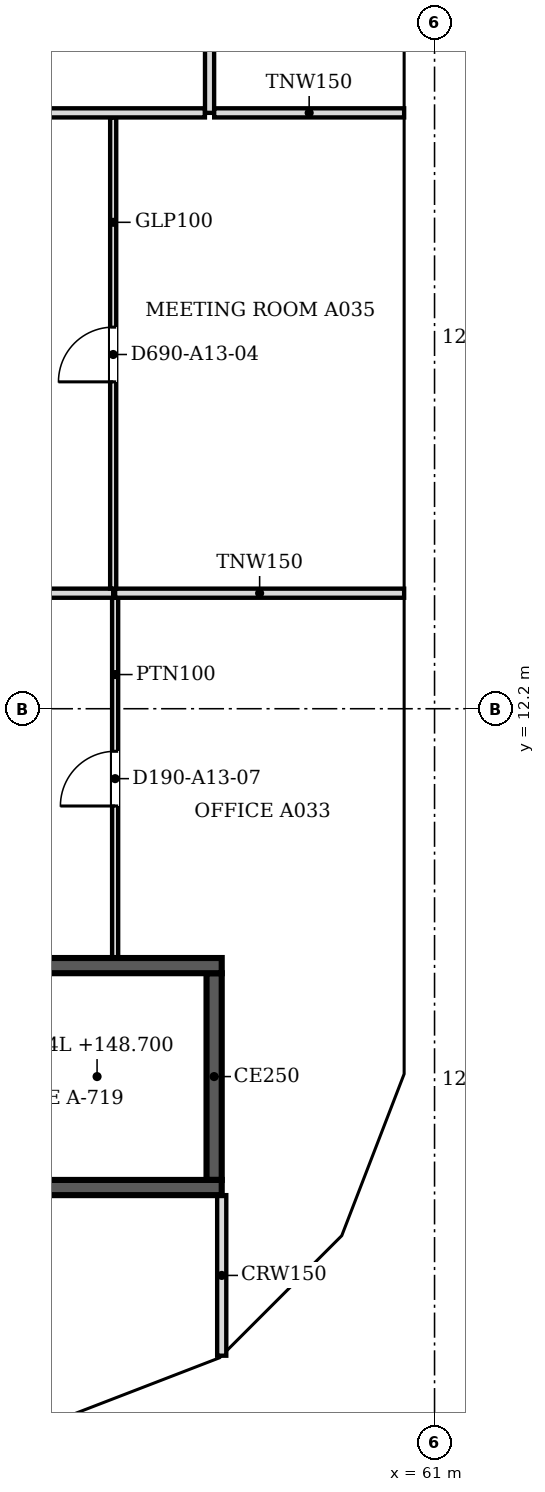
"""IFC4 building model, lengths in metres.
Left out: names, types, materials, properties, quantities, classifications, styles, units other than length and angle.
Written with IfcOpenShell. Run it as: python <this file> out.ifc"""

import sys

from ifc_helpers import new_model, si_unit, direction, frame, frame_2d, origin, place, context, subcontext, project, spatial, polyline, rectangle, outline, extrude, faceted_brep, source, transform, mapped, element, fill, save


model = new_model("IFC4")
c1 = context("Model", 3, precision=1e-05, world=origin(), true_north=direction((0.0, 1.0)))
c2 = subcontext(c1, "Body", "Model", "MODEL_VIEW")
j1 = project(units=[si_unit("LENGTHUNIT", "METRE"), si_unit("PLANEANGLEUNIT", "RADIAN")], contexts=[c1])
p1 = place(None, origin())
s1 = spatial("IfcSite", under=j1, at=p1, CompositionType="ELEMENT")
p2 = place(p1, origin())
s2 = spatial("IfcBuilding", under=s1, at=p2, CompositionType="ELEMENT")
p3 = place(p2, frame((0.0, 0.0, 146.8)))
s3 = spatial("IfcBuildingStorey", under=s2, at=p3, CompositionType="ELEMENT", Elevation=146.8)
m1 = source(origin(), c2, "Body", "Brep", [
    faceted_brep([(2.95, -0.25, 0.0), (3.003, -0.25, 0.068), (3.003, -0.25, 7.532), (2.95, -0.25, 7.6), (0.0, -0.25, 3.8), (0.047, 0.25, 3.86), (2.898, 0.25, 7.532), (2.898, 0.25, 0.068), (0.047, 0.25, 3.74), (2.95, 0.0, 0.0), (2.95, 0.0, 7.6), (0.0, 0.0, 3.8)], [[[0, 1, 2, 3, 4]], [[5, 6, 7, 8]], [[1, 0, 9]], [[10, 3, 2]], [[6, 5, 11, 4, 3, 10]], [[8, 7, 9, 0, 4, 11]], [[8, 11, 5]], [[1, 9, 7, 6, 10, 2]]]),
])
p4 = place(p3, frame((54.854, 0.25, -3.8), z_axis=(0.0, 0.0, 1.0), x_axis=(0.932970071518, 0.359953949349, 0.0)))
e1 = element("IfcWall", 1, at=p4, inside=s3, PredefinedType="SOLIDWALL", context=c2, shape_type="MappedRepresentation", body=[
    mapped(m1, transform((0.0, 0.0, 0.0), scale=1.0)),
])
m2 = source(origin(), c2, "Body", "SweptSolid", [
    extrude(outline(polyline([(2.75, 6.935), (0.316, 3.8), (2.75, 0.665), (2.75, 6.935)])), frame((0.0, 0.26, 0.0), z_axis=(0.0, -1.0, 0.0), x_axis=(1.0, 0.0, 0.0)), (0.0, 0.0, 1.0), 0.52),
])
p5 = place(p4, origin())
e2 = element("IfcOpeningElement", 2, at=p5, cuts=e1, PredefinedType="OPENING", context=c2, shape_type="MappedRepresentation", body=[
    mapped(m2, transform((0.0, 0.0, 0.0), scale=1.0)),
])
m3 = source(origin(), c2, "Body", "Brep", [
    faceted_brep([(0.053, -0.25, 0.0), (2.997, -0.25, 3.8), (0.053, -0.25, 7.6), (0.0, -0.25, 7.532), (0.0, -0.25, 0.068), (0.106, 0.25, 7.532), (2.944, 0.25, 3.868), (2.944, 0.25, 3.732), (0.106, 0.25, 0.068), (2.997, 0.0, 3.8), (0.053, 0.0, 0.0), (0.053, 0.0, 7.6)], [[[0, 1, 2, 3, 4]], [[5, 6, 7, 8]], [[8, 7, 9, 1, 0, 10]], [[6, 5, 11, 2, 1, 9]], [[3, 2, 11]], [[10, 0, 4]], [[8, 10, 4, 3, 11, 5]], [[9, 7, 6]]]),
])
p6 = place(p3, frame((57.569, 1.274, -3.8), z_axis=(0.0, 0.0, 1.0), x_axis=(0.707066050402, 0.707147509625, 0.0)))
e3 = element("IfcWall", 3, at=p6, inside=s3, PredefinedType="SOLIDWALL", context=c2, shape_type="MappedRepresentation", body=[
    mapped(m3, transform((0.0, 0.0, 0.0), scale=1.0)),
])
m4 = source(origin(), c2, "Body", "SweptSolid", [
    extrude(outline(polyline([(0.253, 0.666), (2.681, 3.8), (0.253, 6.934), (0.253, 0.666)])), frame((0.0, 0.26, 0.0), z_axis=(0.0, -1.0, 0.0), x_axis=(1.0, 0.0, 0.0)), (0.0, 0.0, 1.0), 0.52),
])
p7 = place(p6, origin())
e4 = element("IfcOpeningElement", 4, at=p7, cuts=e3, PredefinedType="OPENING", context=c2, shape_type="MappedRepresentation", body=[
    mapped(m4, transform((0.0, 0.0, 0.0), scale=1.0)),
])
m5 = source(origin(), c2, "Body", "Brep", [
    faceted_brep([(2.95, -0.25, 0.0), (2.997, -0.25, 0.059), (2.997, -0.25, 7.541), (2.95, -0.25, 7.6), (0.0, -0.25, 3.8), (0.053, 0.25, 3.868), (2.904, 0.25, 7.54), (2.904, 0.25, 0.06), (0.053, 0.25, 3.732), (2.95, 0.0, 0.0), (2.95, 0.0, 7.6), (0.0, 0.0, 3.8)], [[[0, 1, 2, 3, 4]], [[5, 6, 7, 8]], [[1, 0, 9]], [[10, 3, 2]], [[6, 5, 11, 4, 3, 10]], [[8, 7, 9, 0, 4, 11]], [[8, 11, 5]], [[1, 9, 7, 6, 10, 2]]]),
])
p8 = place(p3, frame((59.688, 3.394, -3.8), z_axis=(0.0, 0.0, 1.0), x_axis=(0.359972353723, 0.932962970624, 0.0)))
e5 = element("IfcWall", 5, at=p8, inside=s3, PredefinedType="SOLIDWALL", context=c2, shape_type="MappedRepresentation", body=[
    mapped(m5, transform((0.0, 0.0, 0.0), scale=1.0)),
])
p9 = place(p8, origin())
e6 = element("IfcOpeningElement", 6, at=p9, cuts=e5, PredefinedType="OPENING", context=c2, shape_type="MappedRepresentation", body=[
    mapped(m2, transform((0.0, 0.0, 0.0), scale=1.0)),
])
m6 = source(origin(), c2, "Body", "Brep", [
    faceted_brep([(0.047, -0.25, 0.0), (3.05, -0.25, 3.8), (0.047, -0.25, 7.6), (0.0, -0.25, 7.54), (0.0, -0.25, 0.06), (0.093, 0.25, 7.541), (3.05, 0.25, 3.8), (0.093, 0.25, 0.059), (0.047, 0.0, 0.0), (0.047, 0.0, 7.6)], [[[0, 1, 2, 3, 4]], [[5, 6, 7]], [[7, 6, 1, 0, 8]], [[6, 5, 9, 2, 1]], [[3, 2, 9]], [[8, 0, 4]], [[7, 8, 4, 3, 9, 5]]]),
])
p10 = place(p3, frame((60.75, 6.1, -3.8), z_axis=(0.0, 0.0, 1.0), x_axis=(0.0, 1.0, 0.0)))
e7 = element("IfcWall", 7, at=p10, inside=s3, PredefinedType="SOLIDWALL", context=c2, shape_type="MappedRepresentation", body=[
    mapped(m6, transform((0.0, 0.0, 0.0), scale=1.0)),
])
m7 = source(origin(), c2, "Body", "SweptSolid", [
    extrude(outline(polyline([(0.247, 0.656), (2.731, 3.8), (0.247, 6.944), (0.247, 0.656)])), frame((0.0, 0.26, 0.0), z_axis=(0.0, -1.0, 0.0), x_axis=(1.0, 0.0, 0.0)), (0.0, 0.0, 1.0), 0.52),
])
p11 = place(p10, origin())
e8 = element("IfcOpeningElement", 8, at=p11, cuts=e7, PredefinedType="OPENING", context=c2, shape_type="MappedRepresentation", body=[
    mapped(m7, transform((0.0, 0.0, 0.0), scale=1.0)),
])
m8 = source(origin(), c2, "Body", "SweptSolid", [
    extrude(outline(polyline([(3.05, 0.0), (6.1, 3.8), (3.05, 7.6), (0.0, 3.8), (3.05, 0.0)])), frame((0.0, 0.25, 0.0), z_axis=(0.0, -1.0, 0.0), x_axis=(1.0, 0.0, 0.0)), (0.0, 0.0, 1.0), 0.5),
])
p12 = place(p3, frame((60.75, 9.15, -3.8), z_axis=(0.0, 0.0, 1.0), x_axis=(0.0, 1.0, 0.0)))
e9 = element("IfcWall", 9, at=p12, inside=s3, PredefinedType="SOLIDWALL", context=c2, shape_type="MappedRepresentation", body=[
    mapped(m8, transform((0.0, 0.0, 0.0), scale=1.0)),
])
m9 = source(origin(), c2, "Body", "SweptSolid", [
    extrude(outline(polyline([(3.05, 0.399), (5.78, 3.8), (3.05, 7.201), (0.321, 3.8), (3.05, 0.399)])), frame((0.0, 0.26, 0.0), z_axis=(0.0, -1.0, 0.0), x_axis=(1.0, 0.0, 0.0)), (0.0, 0.0, 1.0), 0.52),
])
p13 = place(p12, origin())
e10 = element("IfcOpeningElement", 10, at=p13, cuts=e9, PredefinedType="OPENING", context=c2, shape_type="MappedRepresentation", body=[
    mapped(m9, transform((0.0, 0.0, 0.0), scale=1.0)),
])
p14 = place(p3, frame((60.75, 15.25, -3.8), z_axis=(0.0, 0.0, 1.0), x_axis=(0.0, 1.0, 0.0)))
e11 = element("IfcWall", 11, at=p14, inside=s3, PredefinedType="SOLIDWALL", context=c2, shape_type="MappedRepresentation", body=[
    mapped(m8, transform((0.0, 0.0, 0.0), scale=1.0)),
])
p15 = place(p14, origin())
e12 = element("IfcOpeningElement", 12, at=p15, cuts=e11, PredefinedType="OPENING", context=c2, shape_type="MappedRepresentation", body=[
    mapped(m9, transform((0.0, 0.0, 0.0), scale=1.0)),
])
m10 = source(origin(), c2, "Body", "Brep", [
    faceted_brep([(3.05, -0.25, 0.0), (6.1, -0.25, 3.8), (6.1, -0.25, 3.8), (3.05, -0.25, 7.6), (0.0, -0.25, 3.8), (0.0, 0.25, 3.8), (3.05, 0.25, 7.6), (6.1, 0.25, 3.8), (6.1, 0.25, 3.8), (3.05, 0.25, 0.0)], [[[0, 1, 2, 3, 4]], [[5, 6, 7, 8, 9]], [[9, 8, 1, 0]], [[7, 6, 3, 2]], [[6, 5, 4, 3]], [[5, 9, 0, 4]], [[1, 8, 7, 2]]]),
])
p16 = place(p3, frame((60.75, 21.35, -3.8), z_axis=(0.0, 0.0, 1.0), x_axis=(0.0, 1.0, 0.0)))
e13 = element("IfcWall", 13, at=p16, inside=s3, PredefinedType="SOLIDWALL", context=c2, shape_type="MappedRepresentation", body=[
    mapped(m10, transform((0.0, 0.0, 0.0), scale=1.0)),
])
p17 = place(p16, origin())
e14 = element("IfcOpeningElement", 14, at=p17, cuts=e13, PredefinedType="OPENING", context=c2, shape_type="MappedRepresentation", body=[
    mapped(m9, transform((0.0, 0.0, 0.0), scale=1.0)),
])
m11 = source(origin(), c2, "Body", "Brep", [
    faceted_brep([(0.047, -0.25, 0.0), (2.997, -0.25, 3.8), (0.0, -0.25, 3.8), (0.0, -0.25, 0.059), (0.093, 0.25, 3.8), (2.944, 0.25, 3.8), (2.944, 0.25, 3.732), (0.093, 0.25, 0.06), (2.997, 0.0, 3.8), (0.047, 0.0, 0.0)], [[[0, 1, 2, 3]], [[4, 5, 6, 7]], [[7, 6, 8, 1, 0, 9]], [[5, 4, 2, 1, 8]], [[9, 0, 3]], [[7, 9, 3, 2, 4]], [[6, 5, 8]]]),
])
p18 = place(p3, frame((54.81, 0.233, 0.0), z_axis=(0.0, 0.0, 1.0), x_axis=(0.932990326376, 0.359901446078, 0.0)))
e15 = element("IfcWall", 15, at=p18, inside=s3, PredefinedType="SOLIDWALL", context=c2, shape_type="MappedRepresentation", body=[
    mapped(m11, transform((0.0, 0.0, 0.0), scale=1.0)),
])
m12 = source(origin(), c2, "Body", "SweptSolid", [
    extrude(outline(polyline([(0.247, 0.665), (2.487, 3.55), (0.247, 3.55), (0.247, 0.665)])), frame((0.0, 0.26, 0.0), z_axis=(0.0, -1.0, 0.0), x_axis=(1.0, 0.0, 0.0)), (0.0, 0.0, 1.0), 0.52),
])
p19 = place(p18, origin())
e16 = element("IfcOpeningElement", 16, at=p19, cuts=e15, PredefinedType="OPENING", context=c2, shape_type="MappedRepresentation", body=[
    mapped(m12, transform((0.0, 0.0, 0.0), scale=1.0)),
])
m13 = source(origin(), c2, "Body", "Brep", [
    faceted_brep([(2.944, -0.25, 0.0), (2.997, -0.25, 0.068), (2.997, -0.25, 3.8), (0.0, -0.25, 3.8), (0.053, 0.25, 3.8), (2.891, 0.25, 3.8), (2.891, 0.25, 0.068), (0.053, 0.25, 3.732), (2.944, 0.0, 0.0), (0.0, 0.0, 3.8)], [[[0, 1, 2, 3]], [[4, 5, 6, 7]], [[1, 0, 8]], [[5, 4, 9, 3, 2]], [[7, 6, 8, 0, 3, 9]], [[7, 9, 4]], [[1, 8, 6, 5, 2]]]),
])
p20 = place(p3, frame((57.606, 1.312, 0.0), z_axis=(0.0, 0.0, 1.0), x_axis=(0.707147509625, 0.707066050402, 0.0)))
e17 = element("IfcWall", 17, at=p20, inside=s3, PredefinedType="SOLIDWALL", context=c2, shape_type="MappedRepresentation", body=[
    mapped(m13, transform((0.0, 0.0, 0.0), scale=1.0)),
])
m14 = source(origin(), c2, "Body", "SweptSolid", [
    extrude(outline(polyline([(2.744, 3.55), (0.51, 3.55), (2.744, 0.666), (2.744, 3.55)])), frame((0.0, 0.26, 0.0), z_axis=(0.0, -1.0, 0.0), x_axis=(1.0, 0.0, 0.0)), (0.0, 0.0, 1.0), 0.52),
])
p21 = place(p20, origin())
e18 = element("IfcOpeningElement", 18, at=p21, cuts=e17, PredefinedType="OPENING", context=c2, shape_type="MappedRepresentation", body=[
    mapped(m14, transform((0.0, 0.0, 0.0), scale=1.0)),
])
m15 = source(origin(), c2, "Body", "Brep", [
    faceted_brep([(0.053, -0.25, 0.0), (3.003, -0.25, 3.8), (0.0, -0.25, 3.8), (0.0, -0.25, 0.068), (0.106, 0.25, 3.8), (2.957, 0.25, 3.8), (2.957, 0.25, 3.74), (0.106, 0.25, 0.068), (3.003, 0.0, 3.8), (0.053, 0.0, 0.0)], [[[0, 1, 2, 3]], [[4, 5, 6, 7]], [[7, 6, 8, 1, 0, 9]], [[5, 4, 2, 1, 8]], [[9, 0, 3]], [[7, 9, 3, 2, 4]], [[6, 5, 8]]]),
])
p22 = place(p3, frame((59.669, 3.344, 0.0), z_axis=(0.0, 0.0, 1.0), x_axis=(0.35992665181, 0.932980602862, 0.0)))
e19 = element("IfcWall", 19, at=p22, inside=s3, PredefinedType="SOLIDWALL", context=c2, shape_type="MappedRepresentation", body=[
    mapped(m15, transform((0.0, 0.0, 0.0), scale=1.0)),
])
m16 = source(origin(), c2, "Body", "SweptSolid", [
    extrude(outline(polyline([(0.253, 0.665), (2.493, 3.55), (0.253, 3.55), (0.253, 0.665)])), frame((0.0, 0.26, 0.0), z_axis=(0.0, -1.0, 0.0), x_axis=(1.0, 0.0, 0.0)), (0.0, 0.0, 1.0), 0.52),
])
p23 = place(p22, origin())
e20 = element("IfcOpeningElement", 20, at=p23, cuts=e19, PredefinedType="OPENING", context=c2, shape_type="MappedRepresentation", body=[
    mapped(m16, transform((0.0, 0.0, 0.0), scale=1.0)),
])
m17 = source(origin(), c2, "Body", "Brep", [
    faceted_brep([(3.003, -0.25, 0.0), (6.053, -0.25, 3.8), (0.0, -0.25, 3.8), (0.047, 0.25, 3.8), (6.053, 0.25, 3.8), (3.003, 0.25, 0.0), (0.047, 0.25, 3.741), (0.0, 0.0, 3.8)], [[[0, 1, 2]], [[3, 4, 5, 6]], [[5, 4, 1, 0]], [[4, 3, 7, 2, 1]], [[6, 5, 0, 2, 7]], [[6, 7, 3]]]),
])
p24 = place(p3, frame((60.75, 6.146, 0.0), z_axis=(0.0, 0.0, 1.0), x_axis=(0.0, 1.0, 0.0)))
e21 = element("IfcWall", 21, at=p24, inside=s3, PredefinedType="SOLIDWALL", context=c2, shape_type="MappedRepresentation", body=[
    mapped(m17, transform((0.0, 0.0, 0.0), scale=1.0)),
])
m18 = source(origin(), c2, "Body", "SweptSolid", [
    extrude(outline(polyline([(3.005, 0.401), (5.532, 3.55), (0.516, 3.55), (3.005, 0.401)])), frame((0.0, 0.26, 0.0), z_axis=(0.0, -1.0, 0.0), x_axis=(1.0, 0.0, 0.0)), (0.0, 0.0, 1.0), 0.52),
])
p25 = place(p24, origin())
e22 = element("IfcOpeningElement", 22, at=p25, cuts=e21, PredefinedType="OPENING", context=c2, shape_type="MappedRepresentation", body=[
    mapped(m18, transform((0.0, 0.0, 0.0), scale=1.0)),
])
m19 = source(origin(), c2, "Body", "SweptSolid", [
    extrude(outline(polyline([(3.05, 0.0), (6.1, 3.8), (0.0, 3.8), (3.05, 0.0)])), frame((0.0, 0.25, 0.0), z_axis=(0.0, -1.0, 0.0), x_axis=(1.0, 0.0, 0.0)), (0.0, 0.0, 1.0), 0.5),
])
p26 = place(p3, frame((60.75, 12.2, 0.0), z_axis=(0.0, 0.0, 1.0), x_axis=(0.0, 1.0, 0.0)))
e23 = element("IfcWall", 23, at=p26, inside=s3, PredefinedType="SOLIDWALL", context=c2, shape_type="MappedRepresentation", body=[
    mapped(m19, transform((0.0, 0.0, 0.0), scale=1.0)),
])
m20 = source(origin(), c2, "Body", "SweptSolid", [
    extrude(outline(polyline([(3.05, 0.399), (5.579, 3.55), (0.521, 3.55), (3.05, 0.399)])), frame((0.0, 0.26, 0.0), z_axis=(0.0, -1.0, 0.0), x_axis=(1.0, 0.0, 0.0)), (0.0, 0.0, 1.0), 0.52),
])
p27 = place(p26, origin())
e24 = element("IfcOpeningElement", 24, at=p27, cuts=e23, PredefinedType="OPENING", context=c2, shape_type="MappedRepresentation", body=[
    mapped(m20, transform((0.0, 0.0, 0.0), scale=1.0)),
])
m21 = source(origin(), c2, "Body", "Brep", [
    faceted_brep([(3.05, -0.25, 0.0), (6.1, -0.25, 3.8), (6.1, -0.25, 3.8), (0.0, -0.25, 3.8), (0.0, 0.25, 3.8), (6.1, 0.25, 3.8), (6.1, 0.25, 3.8), (3.05, 0.25, 0.0)], [[[0, 1, 2, 3]], [[4, 5, 6, 7]], [[7, 6, 1, 0]], [[5, 4, 3, 2]], [[4, 7, 0, 3]], [[1, 6, 5, 2]]]),
])
p28 = place(p3, frame((60.75, 18.3, 0.0), z_axis=(0.0, 0.0, 1.0), x_axis=(0.0, 1.0, 0.0)))
e25 = element("IfcWall", 25, at=p28, inside=s3, PredefinedType="SOLIDWALL", context=c2, shape_type="MappedRepresentation", body=[
    mapped(m21, transform((0.0, 0.0, 0.0), scale=1.0)),
])
p29 = place(p28, origin())
e26 = element("IfcOpeningElement", 26, at=p29, cuts=e25, PredefinedType="OPENING", context=c2, shape_type="MappedRepresentation", body=[
    mapped(m20, transform((0.0, 0.0, 0.0), scale=1.0)),
])
p30 = place(p3, frame((57.5, 4.325, 0.0), z_axis=(0.0, 0.0, 1.0), x_axis=(-1.0, 0.0, 0.0)))
e27 = element("IfcWall", 27, at=p30, inside=s3, PredefinedType="SOLIDWALL", context=c2, shape_type="SweptSolid", body=[
    extrude(rectangle(XDim=8.5, YDim=0.25, at=frame_2d((4.25, 0.0))), origin(), (0.0, 0.0, 1.0), 3.8),
])
m22 = source(origin(), c2, "Body", "SweptSolid", [
    extrude(rectangle(XDim=1.2, YDim=2.1, at=frame_2d((0.6, 1.05))), frame((0.0, 0.135, 0.0), z_axis=(0.0, -1.0, 0.0), x_axis=(1.0, 0.0, 0.0)), (0.0, 0.0, 1.0), 0.27),
])
p31 = place(p30, frame((6.9, 0.0, 0.0)))
e28 = element("IfcOpeningElement", 28, at=p31, cuts=e27, PredefinedType="OPENING", context=c2, shape_type="MappedRepresentation", body=[
    mapped(m22, transform((0.0, 0.0, 0.0), scale=1.0)),
])
p32 = place(p3, frame((49.0, 7.975, 0.0), z_axis=(0.0, 0.0, 1.0), x_axis=(1.0, 0.0, 0.0)))
e29 = element("IfcWall", 29, at=p32, inside=s3, PredefinedType="SOLIDWALL", context=c2, shape_type="SweptSolid", body=[
    extrude(rectangle(XDim=8.5, YDim=0.25, at=frame_2d((4.25, 0.0))), origin(), (0.0, 0.0, 1.0), 3.8),
])
p33 = place(p3, frame((57.375, 7.85, 0.0), z_axis=(0.0, 0.0, 1.0), x_axis=(0.0, -1.0, 0.0)))
e30 = element("IfcWall", 30, at=p33, inside=s3, PredefinedType="SOLIDWALL", context=c2, shape_type="SweptSolid", body=[
    extrude(rectangle(XDim=3.4, YDim=0.25, at=frame_2d((1.7, 0.0))), origin(), (0.0, 0.0, 1.0), 3.8),
])
p34 = place(p3, frame((57.5, 1.559, 0.0), z_axis=(0.0, 0.0, 1.0), x_axis=(0.0, 1.0, 0.0)))
e31 = element("IfcWall", 31, at=p34, inside=s3, PredefinedType="PARTITIONING", context=c2, shape_type="SweptSolid", body=[
    extrude(rectangle(XDim=2.641, YDim=0.15, at=frame_2d((1.32, 0.0))), origin(), (0.0, 0.0, 1.0), 2.888),
])
p35 = place(p3, frame((55.747, 14.024, 0.0), z_axis=(0.0, 0.0, 1.0), x_axis=(0.0, -1.0, 0.0)))
e32 = element("IfcWall", 32, at=p35, inside=s3, PredefinedType="PARTITIONING", context=c2, shape_type="SweptSolid", body=[
    extrude(rectangle(XDim=5.924, YDim=0.1, at=frame_2d((2.962, 0.0))), origin(), (0.0, 0.0, 1.0), 2.888),
])
m23 = source(origin(), c2, "Body", "SweptSolid", [
    extrude(rectangle(XDim=0.9, YDim=2.1, at=frame_2d((0.45, 1.05))), frame((0.0, 0.06, 0.0), z_axis=(0.0, -1.0, 0.0), x_axis=(1.0, 0.0, 0.0)), (0.0, 0.0, 1.0), 0.12),
])
p36 = place(p35, frame((2.524, 0.0, 0.0)))
e33 = element("IfcOpeningElement", 33, at=p36, cuts=e32, PredefinedType="OPENING", context=c2, shape_type="MappedRepresentation", body=[
    mapped(m23, transform((0.0, 0.0, 0.0), scale=1.0)),
])
p37 = place(p3, frame((46.476, 14.1, 0.0), z_axis=(0.0, 0.0, 1.0), x_axis=(1.0, 0.0, 0.0)))
e34 = element("IfcWall", 34, at=p37, inside=s3, PredefinedType="PARTITIONING", context=c2, shape_type="SweptSolid", body=[
    extrude(rectangle(XDim=9.239, YDim=0.15, at=frame_2d((4.62, 0.0))), origin(), (0.0, 0.0, 1.0), 2.888),
])
p38 = place(p3, frame((55.747, 14.1, 0.0), z_axis=(0.0, 0.0, 1.0), x_axis=(1.0, 0.0, 0.0)))
e35 = element("IfcWall", 35, at=p38, inside=s3, PredefinedType="PARTITIONING", context=c2, shape_type="SweptSolid", body=[
    extrude(rectangle(XDim=4.753, YDim=0.15, at=frame_2d((2.376, 0.0))), origin(), (0.0, 0.0, 1.0), 2.888),
])
p39 = place(p3, frame((55.715, 21.924, 0.0), z_axis=(0.0, 0.0, 1.0), x_axis=(0.0, -1.0, 0.0)))
e36 = element("IfcWall", 36, at=p39, inside=s3, PredefinedType="PARTITIONING", context=c2, shape_type="SweptSolid", body=[
    extrude(rectangle(XDim=7.748, YDim=0.1, at=frame_2d((3.874, 0.0))), origin(), (0.0, 0.0, 1.0), 2.888),
])
p40 = place(p39, frame((3.448, 0.0, 0.0)))
e37 = element("IfcOpeningElement", 37, at=p40, cuts=e36, PredefinedType="OPENING", context=c2, shape_type="MappedRepresentation", body=[
    mapped(m23, transform((0.0, 0.0, 0.0), scale=1.0)),
])
p41 = place(p3, frame((46.4, 22.0, 0.0), z_axis=(0.0, 0.0, 1.0), x_axis=(1.0, 0.0, 0.0)))
e38 = element("IfcWall", 38, at=p41, inside=s3, PredefinedType="PARTITIONING", context=c2, shape_type="SweptSolid", body=[
    extrude(rectangle(XDim=10.824, YDim=0.15, at=frame_2d((5.412, 0.0))), origin(), (0.0, 0.0, 1.0), 2.888),
])
p42 = place(p3, frame((57.3, 30.6, 0.0), z_axis=(0.0, 0.0, 1.0), x_axis=(0.0, -1.0, 0.0)))
e39 = element("IfcWall", 39, at=p42, inside=s3, PredefinedType="PARTITIONING", context=c2, shape_type="SweptSolid", body=[
    extrude(rectangle(XDim=8.6, YDim=0.15, at=frame_2d((4.3, 0.0))), origin(), (0.0, 0.0, 1.0), 2.888),
])
m24 = source(origin(), c2, "Body", "SweptSolid", [
    extrude(rectangle(XDim=0.9, YDim=2.1, at=frame_2d((0.45, 1.05))), frame((0.0, 0.085, 0.0), z_axis=(0.0, -1.0, 0.0), x_axis=(1.0, 0.0, 0.0)), (0.0, 0.0, 1.0), 0.17),
])
p43 = place(p42, frame((3.9, 0.0, 0.0)))
e40 = element("IfcOpeningElement", 40, at=p43, cuts=e39, PredefinedType="OPENING", context=c2, shape_type="MappedRepresentation", body=[
    mapped(m24, transform((0.0, 0.0, 0.0), scale=1.0)),
])
p44 = place(p3, frame((57.376, 22.0, 0.0), z_axis=(0.0, 0.0, 1.0), x_axis=(1.0, 0.0, 0.0)))
e41 = element("IfcWall", 41, at=p44, inside=s3, PredefinedType="PARTITIONING", context=c2, shape_type="SweptSolid", body=[
    extrude(rectangle(XDim=3.124, YDim=0.15, at=frame_2d((1.562, 0.0))), origin(), (0.0, 0.0, 1.0), 2.888),
])
m25 = source(origin(), c2, "Body", "SweptSolid", [
    extrude(rectangle(XDim=0.9, YDim=2.1, at=frame_2d((0.45, 1.05))), frame((0.0, 0.025, 0.0), z_axis=(0.0, -1.0, 0.0), x_axis=(1.0, 0.0, 0.0)), (0.0, 0.0, 1.0), 0.05),
])
p45 = place(p36, origin())
e42 = element("IfcDoor", 42, at=p45, inside=s3, OperationType="SINGLE_SWING_RIGHT", PredefinedType="DOOR", context=c2, shape_type="MappedRepresentation", body=[
    mapped(m25, transform((0.0, 0.0, 0.0), scale=1.0)),
])
fill(e33, e42)
p46 = place(p40, origin())
e43 = element("IfcDoor", 43, at=p46, inside=s3, OperationType="SINGLE_SWING_RIGHT", PredefinedType="DOOR", context=c2, shape_type="MappedRepresentation", body=[
    mapped(m25, transform((0.0, 0.0, 0.0), scale=1.0)),
])
fill(e37, e43)
save(model, sys.argv[1])
